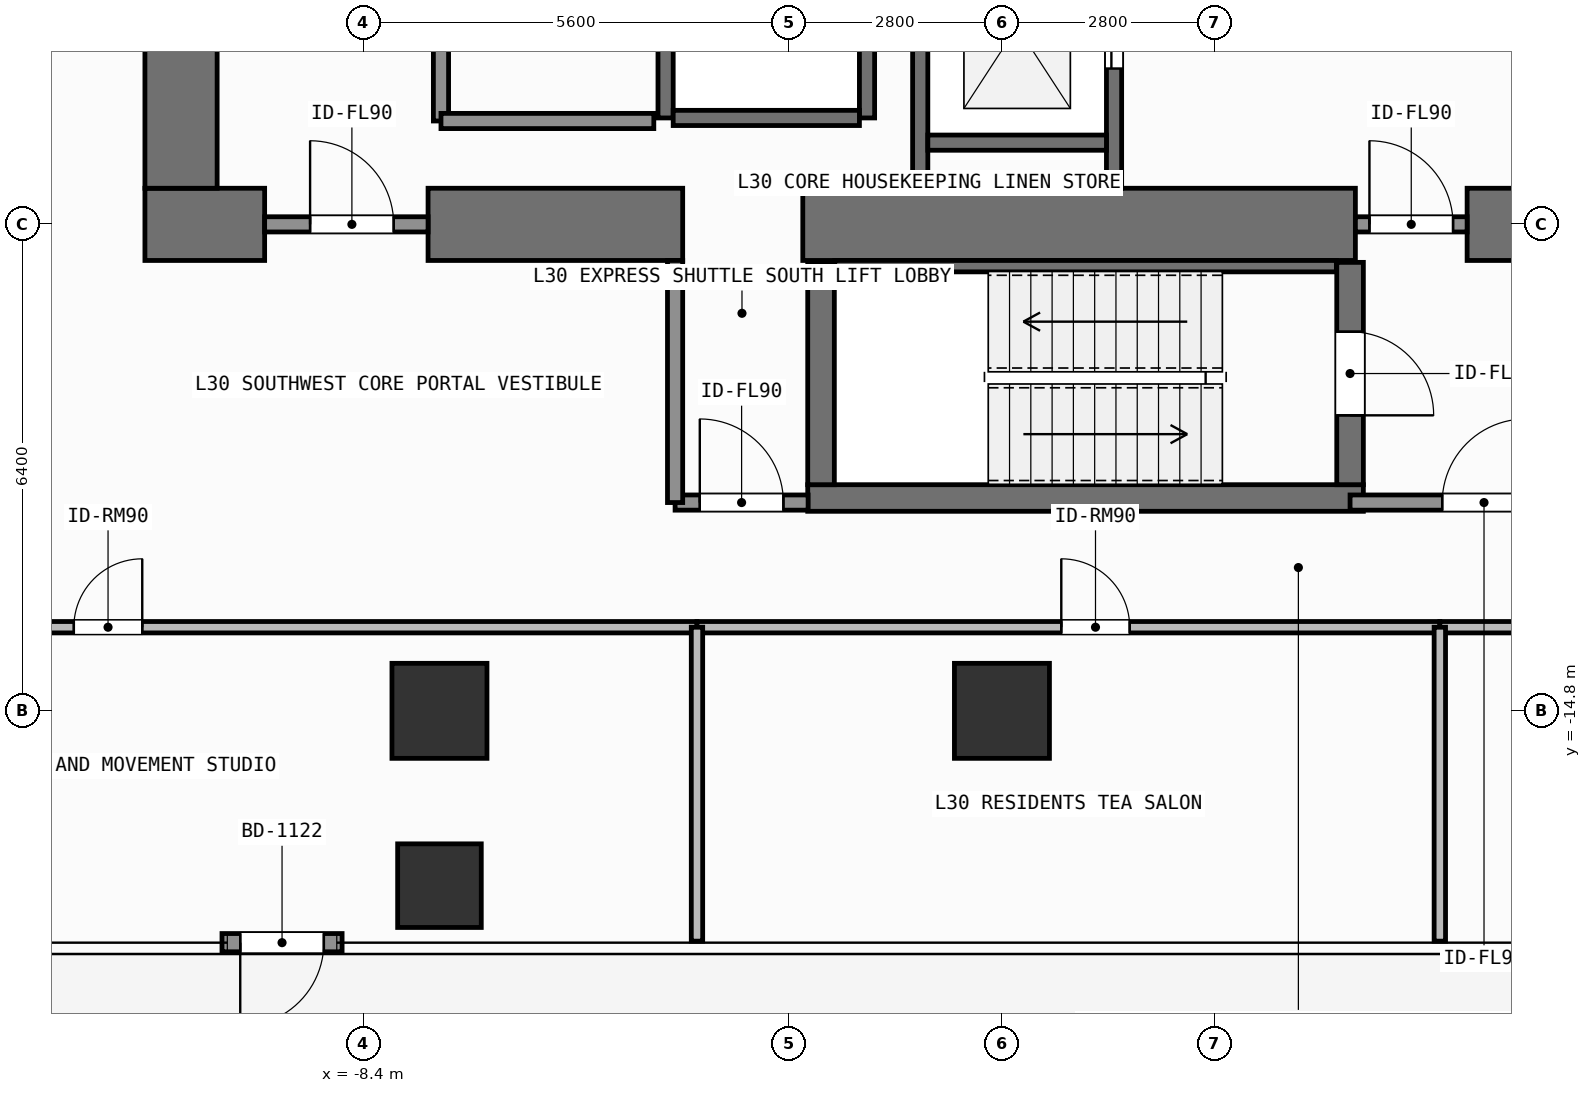
"""IFC4 building model, lengths in metres.
Left out: names, types, materials, properties, quantities, classifications, styles, units other than length and angle.
Written with IfcOpenShell. Run it as: python <this file> out.ifc"""

import sys

from ifc_helpers import new_model, si_unit, direction, frame, frame_2d, origin, origin_2d, place, context, subcontext, project, spatial, rectangle, extrude, element, fill, save


model = new_model("IFC4")
c1 = context("Model", 3, precision=1e-05, world=origin(), true_north=direction((0.0, 1.0)))
c2 = subcontext(c1, "Body", "Model", "MODEL_VIEW")
j1 = project(units=[si_unit("LENGTHUNIT", "METRE"), si_unit("PLANEANGLEUNIT", "RADIAN")], contexts=[c1])
p1 = place(None, origin())
s1 = spatial("IfcSite", under=j1, at=p1, CompositionType="ELEMENT")
p2 = place(p1, origin())
s2 = spatial("IfcBuilding", under=s1, at=p2, CompositionType="ELEMENT")
p3 = place(p2, frame((0.0, 0.0, 121.2)))
s3 = spatial("IfcBuildingStorey", under=s2, at=p3, CompositionType="ELEMENT", Elevation=121.2)
p4 = place(p3, frame((-11.275, -8.4, 0.0), z_axis=(0.0, 0.0, 1.0), x_axis=(1.0, 0.0, 0.0)))
e1 = element("IfcWall", 1, at=p4, inside=s3, PredefinedType="SHEAR", context=c2, shape_type="SweptSolid", body=[
    extrude(rectangle(XDim=1.575, YDim=0.95, at=frame_2d((0.788, 0.0))), origin(), (0.0, 0.0, 1.0), 3.9),
])
p5 = place(p3, frame((-7.55, -8.4, 0.0), z_axis=(0.0, 0.0, 1.0), x_axis=(1.0, 0.0, 0.0)))
e2 = element("IfcWall", 2, at=p5, inside=s3, PredefinedType="SHEAR", context=c2, shape_type="SweptSolid", body=[
    extrude(rectangle(XDim=3.35, YDim=0.95, at=frame_2d((1.675, 0.0))), origin(), (0.0, 0.0, 1.0), 3.9),
])
p6 = place(p3, frame((-2.62, -8.4, 0.0), z_axis=(0.0, 0.0, 1.0), x_axis=(1.0, 0.0, 0.0)))
e3 = element("IfcWall", 3, at=p6, inside=s3, PredefinedType="SHEAR", context=c2, shape_type="SweptSolid", body=[
    extrude(rectangle(XDim=7.27, YDim=0.95, at=frame_2d((3.635, 0.0))), origin(), (0.0, 0.0, 1.0), 3.9),
])
p7 = place(p3, frame((6.12, -8.4, 0.0), z_axis=(0.0, 0.0, 1.0), x_axis=(1.0, 0.0, 0.0)))
e4 = element("IfcWall", 4, at=p7, inside=s3, PredefinedType="SHEAR", context=c2, shape_type="SweptSolid", body=[
    extrude(rectangle(XDim=2.755, YDim=0.95, at=frame_2d((1.377, 0.0))), origin(), (0.0, 0.0, 1.0), 3.9),
])
p8 = place(p3, frame((-10.8, -7.925, 0.0), z_axis=(0.0, 0.0, 1.0), x_axis=(0.0, 1.0, 0.0)))
e5 = element("IfcWall", 5, at=p8, inside=s3, PredefinedType="SHEAR", context=c2, shape_type="SweptSolid", body=[
    extrude(rectangle(XDim=15.85, YDim=0.95, at=frame_2d((7.925, 0.0))), origin(), (0.0, 0.0, 1.0), 3.9),
])
p9 = place(p3, frame((-2.555, -12.0, 0.0), z_axis=(0.0, 0.0, 1.0), x_axis=(1.0, 0.0, 0.0)))
e6 = element("IfcWall", 6, at=p9, inside=s3, PredefinedType="SHEAR", context=c2, shape_type="SweptSolid", body=[
    extrude(rectangle(XDim=7.31, YDim=0.35, at=frame_2d((3.655, 0.0))), origin(), (0.0, 0.0, 1.0), 3.9),
])
p10 = place(p3, frame((-2.2, -8.95, 0.0), z_axis=(0.0, 0.0, 1.0), x_axis=(1.0, 0.0, 0.0)))
e7 = element("IfcWall", 7, at=p10, inside=s3, PredefinedType="SHEAR", context=c2, shape_type="SweptSolid", body=[
    extrude(rectangle(XDim=6.6, YDim=0.15, at=frame_2d((3.3, 0.0))), origin(), (0.0, 0.0, 1.0), 3.9),
])
p11 = place(p3, frame((-2.38, -11.825, 0.0), z_axis=(0.0, 0.0, 1.0), x_axis=(0.0, 1.0, 0.0)))
e8 = element("IfcWall", 8, at=p11, inside=s3, PredefinedType="SHEAR", context=c2, shape_type="SweptSolid", body=[
    extrude(rectangle(XDim=2.925, YDim=0.35, at=frame_2d((1.462, 0.0))), origin(), (0.0, 0.0, 1.0), 3.9),
])
p12 = place(p3, frame((4.58, -8.9, 0.0), z_axis=(0.0, 0.0, 1.0), x_axis=(0.0, -1.0, 0.0)))
e9 = element("IfcWall", 9, at=p12, inside=s3, PredefinedType="SHEAR", context=c2, shape_type="SweptSolid", body=[
    extrude(rectangle(XDim=2.925, YDim=0.35, at=frame_2d((1.462, 0.0))), origin(), (0.0, 0.0, 1.0), 3.9),
])
p13 = place(p12, frame((0.913, 0.0, 0.0)))
e10 = element("IfcOpeningElement", 10, at=p13, cuts=e9, PredefinedType="OPENING", context=c2, shape_type="SweptSolid", body=[
    extrude(rectangle(XDim=1.1, YDim=2.15, at=frame_2d((0.55, 1.075))), frame((0.0, 0.185, 0.0), z_axis=(0.0, -1.0, 0.0), x_axis=(1.0, 0.0, 0.0)), (0.0, 0.0, 1.0), 0.37),
])
for number, where, z_axis, x_axis in (
    (11, (-7.4, -14.8, 0.0), (0.0, 0.0, 1.0), (1.0, 0.0, 0.0)),
    (12, (0.0, -14.8, 0.0), (0.0, 0.0, 1.0), (1.0, 0.0, 0.0)),
):
    element("IfcColumn", number, at=place(p3, frame(where, z_axis=z_axis, x_axis=x_axis)), inside=s3, PredefinedType="COLUMN", context=c2, shape_type="SweptSolid", body=[
        extrude(rectangle(XDim=1.25, YDim=1.25, at=origin_2d()), origin(), (0.0, 0.0, 1.0), 3.9),
    ])
p14 = place(p3, frame((-7.4, -17.1, 0.0), z_axis=(0.0, 0.0, 1.0), x_axis=(1.0, 0.0, 0.0)))
e13 = element("IfcColumn", 13, at=p14, inside=s3, PredefinedType="COLUMN", context=c2, shape_type="SweptSolid", body=[
    extrude(rectangle(XDim=1.1, YDim=1.1, at=origin_2d()), origin(), (0.0, 0.0, 1.0), 3.9),
])
p15 = place(p3, frame((-8.681, -17.85, 0.0), z_axis=(0.0, 0.0, 1.0), x_axis=(-1.0, 0.0, 0.0)))
e14 = element("IfcWall", 14, at=p15, inside=s3, PredefinedType="SOLIDWALL", context=c2, shape_type="SweptSolid", body=[
    extrude(rectangle(XDim=1.58, YDim=0.24, at=frame_2d((0.79, 0.0))), origin(), (0.0, 0.0, 1.0), 3.68),
])
p16 = place(p15, frame((0.24, 0.0, 0.0)))
e15 = element("IfcOpeningElement", 15, at=p16, cuts=e14, PredefinedType="OPENING", context=c2, shape_type="SweptSolid", body=[
    extrude(rectangle(XDim=1.1, YDim=2.2, at=frame_2d((0.55, 1.1))), frame((0.0, 0.13, 0.0), z_axis=(0.0, -1.0, 0.0), x_axis=(1.0, 0.0, 0.0)), (0.0, 0.0, 1.0), 0.26),
])
for number, where, z_axis, x_axis in (
    (16, (-4.425, -7.0, 0.0), (0.0, 0.0, 1.0), (0.0, 1.0, 0.0)),
    (17, (-1.775, -7.0, 0.0), (0.0, 0.0, 1.0), (0.0, 1.0, 0.0)),
):
    element("IfcWall", number, at=place(p3, frame(where, z_axis=z_axis, x_axis=x_axis)), inside=s3, PredefinedType="SHEAR", context=c2, shape_type="SweptSolid", body=[
        extrude(rectangle(XDim=2.8, YDim=0.2, at=frame_2d((1.4, 0.0))), origin(), (0.0, 0.0, 1.0), 3.68),
    ])
p17 = place(p3, frame((-4.325, -7.0, 0.0), z_axis=(0.0, 0.0, 1.0), x_axis=(1.0, 0.0, 0.0)))
e18 = element("IfcWall", 18, at=p17, inside=s3, PredefinedType="SHEAR", context=c2, shape_type="SweptSolid", body=[
    extrude(rectangle(XDim=2.45, YDim=0.2, at=frame_2d((1.225, 0.0))), origin(), (0.0, 0.0, 1.0), 3.68),
])
p18 = place(p3, frame((-1.075, -7.925, 0.0), z_axis=(0.0, 0.0, 1.0), x_axis=(0.0, 1.0, 0.0)))
e19 = element("IfcWall", 19, at=p18, inside=s3, PredefinedType="SHEAR", context=c2, shape_type="SweptSolid", body=[
    extrude(rectangle(XDim=3.65, YDim=0.2, at=frame_2d((1.825, 0.0))), origin(), (0.0, 0.0, 1.0), 3.68),
])
p19 = place(p3, frame((1.475, -7.925, 0.0), z_axis=(0.0, 0.0, 1.0), x_axis=(0.0, 1.0, 0.0)))
e20 = element("IfcWall", 20, at=p19, inside=s3, PredefinedType="SHEAR", context=c2, shape_type="SweptSolid", body=[
    extrude(rectangle(XDim=3.65, YDim=0.2, at=frame_2d((1.825, 0.0))), origin(), (0.0, 0.0, 1.0), 3.68),
])
p20 = place(p19, frame((1.575, 0.0, 0.0)))
e21 = element("IfcOpeningElement", 21, at=p20, cuts=e20, PredefinedType="OPENING", context=c2, shape_type="SweptSolid", body=[
    extrude(rectangle(XDim=1.1, YDim=2.2, at=frame_2d((0.55, 1.1))), frame((0.0, 0.11, 0.0), z_axis=(0.0, -1.0, 0.0), x_axis=(1.0, 0.0, 0.0)), (0.0, 0.0, 1.0), 0.22),
])
p21 = place(p3, frame((-0.975, -7.325, 0.0), z_axis=(0.0, 0.0, 1.0), x_axis=(1.0, 0.0, 0.0)))
e22 = element("IfcWall", 22, at=p21, inside=s3, PredefinedType="SHEAR", context=c2, shape_type="SweptSolid", body=[
    extrude(rectangle(XDim=2.35, YDim=0.2, at=frame_2d((1.175, 0.0))), origin(), (0.0, 0.0, 1.0), 3.68),
])
p22 = place(p3, frame((4.58, -12.06, 0.0), z_axis=(0.0, 0.0, 1.0), x_axis=(1.0, 0.0, 0.0)))
e23 = element("IfcWall", 23, at=p22, inside=s3, PredefinedType="SOLIDWALL", context=c2, shape_type="SweptSolid", body=[
    extrude(rectangle(XDim=3.7, YDim=0.2, at=frame_2d((1.85, 0.0))), origin(), (0.0, 0.0, 1.0), 3.68),
])
p23 = place(p22, frame((1.212, 0.0, 0.0)))
e24 = element("IfcOpeningElement", 24, at=p23, cuts=e23, PredefinedType="OPENING", context=c2, shape_type="SweptSolid", body=[
    extrude(rectangle(XDim=1.1, YDim=2.15, at=frame_2d((0.55, 1.075))), frame((0.0, 0.11, 0.0), z_axis=(0.0, -1.0, 0.0), x_axis=(1.0, 0.0, 0.0)), (0.0, 0.0, 1.0), 0.22),
])
p24 = place(p3, frame((4.65, -8.4, 0.0), z_axis=(0.0, 0.0, 1.0), x_axis=(1.0, 0.0, 0.0)))
e25 = element("IfcWall", 25, at=p24, inside=s3, PredefinedType="SOLIDWALL", context=c2, shape_type="SweptSolid", body=[
    extrude(rectangle(XDim=1.47, YDim=0.2, at=frame_2d((0.735, 0.0))), origin(), (0.0, 0.0, 1.0), 2.72),
])
p25 = place(p24, frame((0.185, 0.0, 0.0)))
e26 = element("IfcOpeningElement", 26, at=p25, cuts=e25, PredefinedType="OPENING", context=c2, shape_type="SweptSolid", body=[
    extrude(rectangle(XDim=1.1, YDim=2.15, at=frame_2d((0.55, 1.075))), frame((0.0, 0.11, 0.0), z_axis=(0.0, -1.0, 0.0), x_axis=(1.0, 0.0, 0.0)), (0.0, 0.0, 1.0), 0.22),
])
p26 = place(p3, frame((-9.7, -8.4, 0.0), z_axis=(0.0, 0.0, 1.0), x_axis=(1.0, 0.0, 0.0)))
e27 = element("IfcWall", 27, at=p26, inside=s3, PredefinedType="SOLIDWALL", context=c2, shape_type="SweptSolid", body=[
    extrude(rectangle(XDim=2.15, YDim=0.2, at=frame_2d((1.075, 0.0))), origin(), (0.0, 0.0, 1.0), 2.72),
])
p27 = place(p26, frame((0.598, 0.0, 0.0)))
e28 = element("IfcOpeningElement", 28, at=p27, cuts=e27, PredefinedType="OPENING", context=c2, shape_type="SweptSolid", body=[
    extrude(rectangle(XDim=1.1, YDim=2.15, at=frame_2d((0.55, 1.075))), frame((0.0, 0.11, 0.0), z_axis=(0.0, -1.0, 0.0), x_axis=(1.0, 0.0, 0.0)), (0.0, 0.0, 1.0), 0.22),
])
p28 = place(p3, frame((-4.3, -12.06, 0.0), z_axis=(0.0, 0.0, 1.0), x_axis=(1.0, 0.0, 0.0)))
e29 = element("IfcWall", 29, at=p28, inside=s3, PredefinedType="SOLIDWALL", context=c2, shape_type="SweptSolid", body=[
    extrude(rectangle(XDim=1.75, YDim=0.2, at=frame_2d((0.875, 0.0))), origin(), (0.0, 0.0, 1.0), 3.68),
])
p29 = place(p28, frame((0.325, 0.0, 0.0)))
e30 = element("IfcOpeningElement", 30, at=p29, cuts=e29, PredefinedType="OPENING", context=c2, shape_type="SweptSolid", body=[
    extrude(rectangle(XDim=1.1, YDim=2.15, at=frame_2d((0.55, 1.075))), frame((0.0, 0.11, 0.0), z_axis=(0.0, -1.0, 0.0), x_axis=(1.0, 0.0, 0.0)), (0.0, 0.0, 1.0), 0.22),
])
p30 = place(p3, frame((-7.38, -7.04, 0.0), z_axis=(0.0, 0.0, 1.0), x_axis=(0.0, 1.0, 0.0)))
e31 = element("IfcWall", 31, at=p30, inside=s3, PredefinedType="SOLIDWALL", context=c2, shape_type="SweptSolid", body=[
    extrude(rectangle(XDim=5.72, YDim=0.2, at=frame_2d((2.86, 0.0))), origin(), (0.0, 0.0, 1.0), 3.68),
])
p31 = place(p30, frame((2.31, 0.0, 0.0)))
e32 = element("IfcOpeningElement", 32, at=p31, cuts=e31, PredefinedType="OPENING", context=c2, shape_type="SweptSolid", body=[
    extrude(rectangle(XDim=0.92, YDim=2.1, at=frame_2d((0.46, 1.05))), frame((0.0, 0.11, 0.0), z_axis=(0.0, -1.0, 0.0), x_axis=(1.0, 0.0, 0.0)), (0.0, 0.0, 1.0), 0.22),
])
p32 = place(p3, frame((-19.33, -13.7, 0.0), z_axis=(0.0, 0.0, 1.0), x_axis=(1.0, 0.0, 0.0)))
e33 = element("IfcWall", 33, at=p32, inside=s3, PredefinedType="PARTITIONING", context=c2, shape_type="SweptSolid", body=[
    extrude(rectangle(XDim=15.318, YDim=0.15, at=frame_2d((7.659, 0.0))), origin(), (0.0, 0.0, 1.0), 3.68),
])
p33 = place(p32, frame((7.12, 0.0, 0.0)))
e34 = element("IfcOpeningElement", 34, at=p33, cuts=e33, PredefinedType="OPENING", context=c2, shape_type="SweptSolid", body=[
    extrude(rectangle(XDim=0.9, YDim=2.1, at=frame_2d((0.45, 1.05))), frame((0.0, 0.085, 0.0), z_axis=(0.0, -1.0, 0.0), x_axis=(1.0, 0.0, 0.0)), (0.0, 0.0, 1.0), 0.17),
])
p34 = place(p3, frame((-4.012, -13.7, 0.0), z_axis=(0.0, 0.0, 1.0), x_axis=(1.0, 0.0, 0.0)))
e35 = element("IfcWall", 35, at=p34, inside=s3, PredefinedType="PARTITIONING", context=c2, shape_type="SweptSolid", body=[
    extrude(rectangle(XDim=9.773, YDim=0.15, at=frame_2d((4.886, 0.0))), origin(), (0.0, 0.0, 1.0), 3.68),
])
p35 = place(p34, frame((4.793, 0.0, 0.0)))
e36 = element("IfcOpeningElement", 36, at=p35, cuts=e35, PredefinedType="OPENING", context=c2, shape_type="SweptSolid", body=[
    extrude(rectangle(XDim=0.9, YDim=2.1, at=frame_2d((0.45, 1.05))), frame((0.0, 0.085, 0.0), z_axis=(0.0, -1.0, 0.0), x_axis=(1.0, 0.0, 0.0)), (0.0, 0.0, 1.0), 0.17),
])
p36 = place(p3, frame((5.761, -13.7, 0.0), z_axis=(0.0, 0.0, 1.0), x_axis=(1.0, 0.0, 0.0)))
e37 = element("IfcWall", 37, at=p36, inside=s3, PredefinedType="PARTITIONING", context=c2, shape_type="SweptSolid", body=[
    extrude(rectangle(XDim=10.704, YDim=0.15, at=frame_2d((5.352, 0.0))), origin(), (0.0, 0.0, 1.0), 3.68),
])
p37 = place(p36, frame((4.812, 0.0, 0.0)))
e38 = element("IfcOpeningElement", 38, at=p37, cuts=e37, PredefinedType="OPENING", context=c2, shape_type="SweptSolid", body=[
    extrude(rectangle(XDim=0.9, YDim=2.1, at=frame_2d((0.45, 1.05))), frame((0.0, 0.085, 0.0), z_axis=(0.0, -1.0, 0.0), x_axis=(1.0, 0.0, 0.0)), (0.0, 0.0, 1.0), 0.17),
])
p38 = place(p3, frame((-4.3, -12.06, 0.0), z_axis=(0.0, 0.0, 1.0), x_axis=(0.0, 1.0, 0.0)))
e39 = element("IfcWall", 39, at=p38, inside=s3, PredefinedType="SOLIDWALL", context=c2, shape_type="SweptSolid", body=[
    extrude(rectangle(XDim=3.185, YDim=0.2, at=frame_2d((1.593, 0.0))), origin(), (0.0, 0.0, 1.0), 3.68),
])
p39 = place(p3, frame((-7.38, -7.04, 0.0), z_axis=(0.0, 0.0, 1.0), x_axis=(1.0, 0.0, 0.0)))
e40 = element("IfcWall", 40, at=p39, inside=s3, PredefinedType="SOLIDWALL", context=c2, shape_type="SweptSolid", body=[
    extrude(rectangle(XDim=2.8, YDim=0.2, at=frame_2d((1.4, 0.0))), origin(), (0.0, 0.0, 1.0), 3.68),
])
for number, where, z_axis, x_axis in (
    (41, (-4.012, -17.83, 0.0), (0.0, 0.0, 1.0), (0.0, 1.0, 0.0)),
    (42, (5.761, -17.83, 0.0), (0.0, 0.0, 1.0), (0.0, 1.0, 0.0)),
):
    element("IfcWall", number, at=place(p3, frame(where, z_axis=z_axis, x_axis=x_axis)), inside=s3, PredefinedType="PARTITIONING", context=c2, shape_type="SweptSolid", body=[
        extrude(rectangle(XDim=4.13, YDim=0.15, at=frame_2d((2.065, 0.0))), origin(), (0.0, 0.0, 1.0), 3.68),
    ])
p40 = place(p16, origin())
e43 = element("IfcDoor", 43, at=p40, inside=s3, OperationType="SINGLE_SWING_RIGHT", PredefinedType="DOOR", context=c2, shape_type="SweptSolid", body=[
    extrude(rectangle(XDim=1.1, YDim=2.2, at=frame_2d((0.55, 1.1))), frame((0.0, 0.025, 0.0), z_axis=(0.0, -1.0, 0.0), x_axis=(1.0, 0.0, 0.0)), (0.0, 0.0, 1.0), 0.05),
])
fill(e15, e43)
p41 = place(p20, origin())
e44 = element("IfcDoor", 44, at=p41, inside=s3, OperationType="SLIDING_TO_LEFT", PredefinedType="DOOR", context=c2, shape_type="SweptSolid", body=[
    extrude(rectangle(XDim=1.1, YDim=2.2, at=frame_2d((0.55, 1.1))), frame((0.0, 0.025, 0.0), z_axis=(0.0, -1.0, 0.0), x_axis=(1.0, 0.0, 0.0)), (0.0, 0.0, 1.0), 0.05),
])
fill(e21, e44)
p42 = place(p13, origin())
e45 = element("IfcDoor", 45, at=p42, inside=s3, OperationType="SINGLE_SWING_RIGHT", PredefinedType="DOOR", context=c2, shape_type="SweptSolid", body=[
    extrude(rectangle(XDim=1.1, YDim=2.15, at=frame_2d((0.55, 1.075))), frame((0.0, 0.025, 0.0), z_axis=(0.0, -1.0, 0.0), x_axis=(1.0, 0.0, 0.0)), (0.0, 0.0, 1.0), 0.05),
])
fill(e10, e45)
p43 = place(p23, origin())
e46 = element("IfcDoor", 46, at=p43, inside=s3, OperationType="SINGLE_SWING_RIGHT", PredefinedType="DOOR", context=c2, shape_type="SweptSolid", body=[
    extrude(rectangle(XDim=1.1, YDim=2.15, at=frame_2d((0.55, 1.075))), frame((0.0, 0.025, 0.0), z_axis=(0.0, -1.0, 0.0), x_axis=(1.0, 0.0, 0.0)), (0.0, 0.0, 1.0), 0.05),
])
fill(e24, e46)
p44 = place(p25, origin())
e47 = element("IfcDoor", 47, at=p44, inside=s3, OperationType="SINGLE_SWING_LEFT", PredefinedType="DOOR", context=c2, shape_type="SweptSolid", body=[
    extrude(rectangle(XDim=1.1, YDim=2.15, at=frame_2d((0.55, 1.075))), frame((0.0, 0.025, 0.0), z_axis=(0.0, -1.0, 0.0), x_axis=(1.0, 0.0, 0.0)), (0.0, 0.0, 1.0), 0.05),
])
fill(e26, e47)
p45 = place(p27, origin())
e48 = element("IfcDoor", 48, at=p45, inside=s3, OperationType="SINGLE_SWING_LEFT", PredefinedType="DOOR", context=c2, shape_type="SweptSolid", body=[
    extrude(rectangle(XDim=1.1, YDim=2.15, at=frame_2d((0.55, 1.075))), frame((0.0, 0.025, 0.0), z_axis=(0.0, -1.0, 0.0), x_axis=(1.0, 0.0, 0.0)), (0.0, 0.0, 1.0), 0.05),
])
fill(e28, e48)
p46 = place(p29, origin())
e49 = element("IfcDoor", 49, at=p46, inside=s3, OperationType="SINGLE_SWING_LEFT", PredefinedType="DOOR", context=c2, shape_type="SweptSolid", body=[
    extrude(rectangle(XDim=1.1, YDim=2.15, at=frame_2d((0.55, 1.075))), frame((0.0, 0.025, 0.0), z_axis=(0.0, -1.0, 0.0), x_axis=(1.0, 0.0, 0.0)), (0.0, 0.0, 1.0), 0.05),
])
fill(e30, e49)
p47 = place(p33, origin())
e50 = element("IfcDoor", 50, at=p47, inside=s3, OperationType="SINGLE_SWING_RIGHT", PredefinedType="DOOR", context=c2, shape_type="SweptSolid", body=[
    extrude(rectangle(XDim=0.9, YDim=2.1, at=frame_2d((0.45, 1.05))), frame((0.0, 0.025, 0.0), z_axis=(0.0, -1.0, 0.0), x_axis=(1.0, 0.0, 0.0)), (0.0, 0.0, 1.0), 0.05),
])
fill(e34, e50)
p48 = place(p35, origin())
e51 = element("IfcDoor", 51, at=p48, inside=s3, OperationType="SINGLE_SWING_LEFT", PredefinedType="DOOR", context=c2, shape_type="SweptSolid", body=[
    extrude(rectangle(XDim=0.9, YDim=2.1, at=frame_2d((0.45, 1.05))), frame((0.0, 0.025, 0.0), z_axis=(0.0, -1.0, 0.0), x_axis=(1.0, 0.0, 0.0)), (0.0, 0.0, 1.0), 0.05),
])
fill(e36, e51)
save(model, sys.argv[1])
